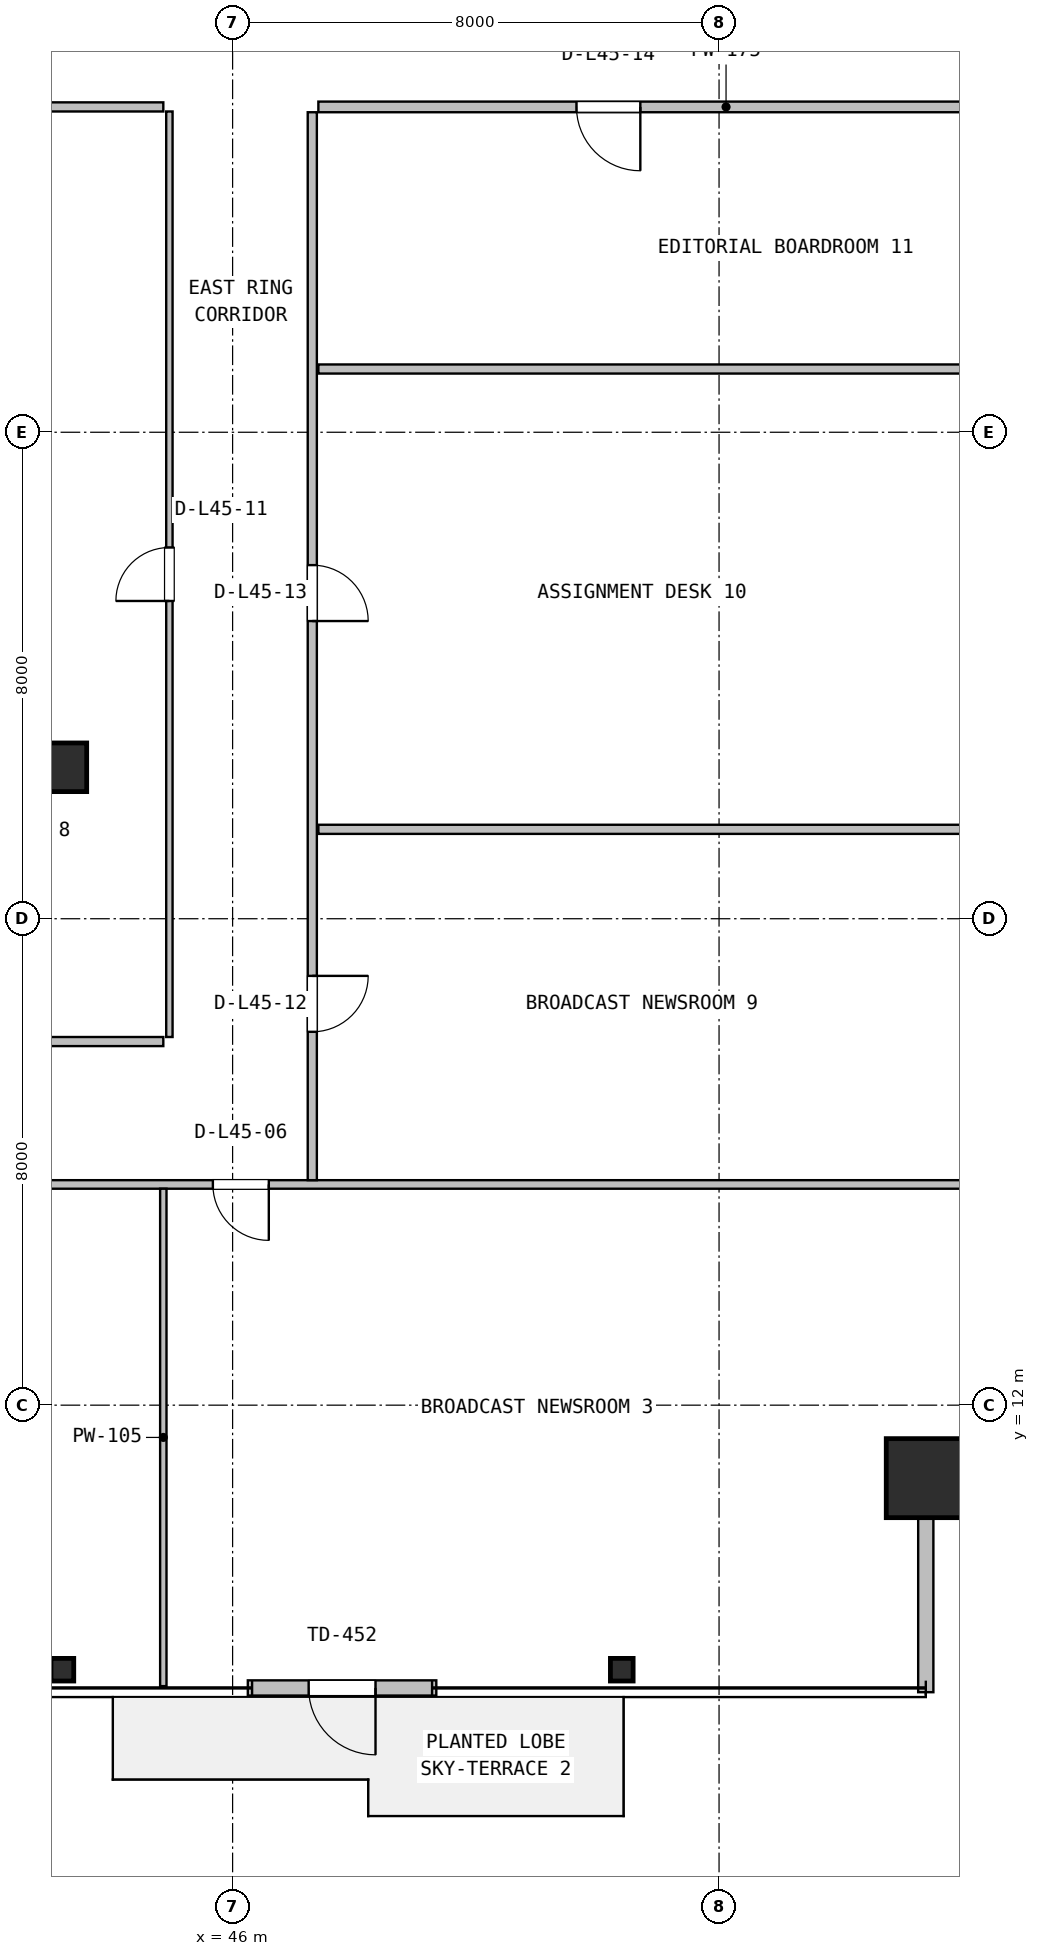
"""IFC4 building model, lengths in metres.
Left out: names, types, materials, properties, quantities, classifications, styles, units other than length and angle.
Written with IfcOpenShell. Run it as: python <this file> out.ifc"""

import sys

from ifc_helpers import new_model, si_unit, direction, frame, frame_2d, origin, origin_2d, place, context, subcontext, project, spatial, rectangle, hollow_rectangle, i_section, extrude, source, transform, mapped, element, fill, save


model = new_model("IFC4")
c1 = context("Model", 3, precision=1e-05, world=origin(), true_north=direction((0.0, 1.0)))
c2 = subcontext(c1, "Body", "Model", "MODEL_VIEW")
j1 = project(units=[si_unit("LENGTHUNIT", "METRE"), si_unit("PLANEANGLEUNIT", "RADIAN")], contexts=[c1])
p1 = place(None, origin())
s1 = spatial("IfcSite", under=j1, at=p1, CompositionType="ELEMENT")
p2 = place(p1, origin())
s2 = spatial("IfcBuilding", under=s1, at=p2, CompositionType="ELEMENT")
p3 = place(p2, frame((0.0, 0.0, 183.8)))
s3 = spatial("IfcBuildingStorey", under=s2, at=p3, CompositionType="ELEMENT", Elevation=183.8)
m1 = source(origin(), c2, "Body", "SweptSolid", [
    extrude(hollow_rectangle(XDim=1.3, YDim=1.3, WallThickness=0.05, at=origin_2d()), origin(), (0.0, 0.0, 1.0), 3.8),
])
p4 = place(p3, frame((57.4, 10.8, 0.0), z_axis=(0.0, 0.0, 1.0), x_axis=(1.0, 0.0, 0.0)))
e1 = element("IfcColumn", 1, at=p4, inside=s3, PredefinedType="COLUMN", context=c2, shape_type="MappedRepresentation", body=[
    mapped(m1, transform((0.0, 0.0, 0.0), x_axis=(1.0, 0.0, 0.0), y_axis=(0.0, 1.0, 0.0), z_axis=(0.0, 0.0, 1.0), scale=1.0)),
])
m2 = source(origin(), c2, "Body", "SweptSolid", [
    extrude(i_section(OverallWidth=0.374, OverallDepth=0.372, WebThickness=0.016, FlangeThickness=0.026, FilletRadius=0.016, at=origin_2d()), origin(), (0.0, 0.0, 1.0), 3.8),
])
for number, where, z_axis, x_axis in (
    (2, (43.2, 7.65, 0.0), (0.0, 0.0, 1.0), (1.0, 0.0, 0.0)),
    (3, (52.4, 7.65, 0.0), (0.0, 0.0, 1.0), (1.0, 0.0, 0.0)),
):
    element("IfcColumn", number, at=place(p3, frame(where, z_axis=z_axis, x_axis=x_axis)), inside=s3, PredefinedType="COLUMN", context=c2, shape_type="MappedRepresentation", body=[
        mapped(m2, transform((0.0, 0.0, 0.0), x_axis=(1.0, 0.0, 0.0), y_axis=(0.0, 1.0, 0.0), z_axis=(0.0, 0.0, 1.0), scale=1.0)),
    ])
m3 = source(origin(), c2, "Body", "SweptSolid", [
    extrude(rectangle(XDim=0.8, YDim=0.8, at=origin_2d()), origin(), (0.0, 0.0, 1.0), 3.8),
])
p5 = place(p3, frame((43.2, 22.49, 0.0), z_axis=(0.0, 0.0, 1.0), x_axis=(1.0, 0.0, 0.0)))
e4 = element("IfcColumn", 4, at=p5, inside=s3, PredefinedType="COLUMN", context=c2, shape_type="MappedRepresentation", body=[
    mapped(m3, transform((0.0, 0.0, 0.0), x_axis=(1.0, 0.0, 0.0), y_axis=(0.0, 1.0, 0.0), z_axis=(0.0, 0.0, 1.0), scale=1.0)),
])
p6 = place(p3, frame((46.25, 7.35, 0.0), z_axis=(0.0, 0.0, 1.0), x_axis=(1.0, 0.0, 0.0)))
e5 = element("IfcWall", 5, at=p6, inside=s3, PredefinedType="SOLIDWALL", context=c2, shape_type="SweptSolid", body=[
    extrude(rectangle(XDim=3.1, YDim=0.25, at=frame_2d((1.55, 0.0))), origin(), (0.0, 0.0, 1.0), 3.53),
])
p7 = place(p6, frame((1.0, 0.0, 0.0)))
e6 = element("IfcOpeningElement", 6, at=p7, cuts=e5, PredefinedType="OPENING", context=c2, shape_type="SweptSolid", body=[
    extrude(rectangle(XDim=1.1, YDim=2.15, at=frame_2d((0.55, 1.075))), frame((0.0, 0.135, 0.0), z_axis=(0.0, -1.0, 0.0), x_axis=(1.0, 0.0, 0.0)), (0.0, 0.0, 1.0), 0.27),
])
p8 = place(p3, frame((57.4, 7.28, 0.0), z_axis=(0.0, 0.0, 1.0), x_axis=(0.0, 1.0, 0.0)))
e7 = element("IfcWall", 7, at=p8, inside=s3, PredefinedType="SOLIDWALL", context=c2, shape_type="SweptSolid", body=[
    extrude(rectangle(XDim=3.6, YDim=0.25, at=frame_2d((1.8, 0.0))), origin(), (0.0, 0.0, 1.0), 3.108),
])
p9 = place(p3, frame((7.18, 15.63, 0.0), z_axis=(0.0, 0.0, 1.0), x_axis=(1.0, 0.0, 0.0)))
e8 = element("IfcWall", 8, at=p9, inside=s3, PredefinedType="PARTITIONING", context=c2, shape_type="SweptSolid", body=[
    extrude(rectangle(XDim=53.64, YDim=0.14, at=frame_2d((26.82, 0.0))), origin(), (0.0, 0.0, 1.0), 2.909),
])
p10 = place(p9, frame((14.015, 0.0, 0.0)))
e9 = element("IfcOpeningElement", 9, at=p10, cuts=e8, PredefinedType="OPENING", context=c2, shape_type="SweptSolid", body=[
    extrude(rectangle(XDim=1.0, YDim=2.1, at=frame_2d((0.5, 1.05))), frame((0.0, 0.08, 0.0), z_axis=(0.0, -1.0, 0.0), x_axis=(1.0, 0.0, 0.0)), (0.0, 0.0, 1.0), 0.16),
])
p11 = place(p9, frame((26.295, 0.0, 0.0)))
e10 = element("IfcOpeningElement", 10, at=p11, cuts=e8, PredefinedType="OPENING", context=c2, shape_type="SweptSolid", body=[
    extrude(rectangle(XDim=0.88, YDim=2.06, at=frame_2d((0.44, 1.03))), frame((0.0, 0.08, 0.0), z_axis=(0.0, -1.0, 0.0), x_axis=(1.0, 0.0, 0.0)), (0.0, 0.0, 1.0), 0.16),
])
p12 = place(p9, frame((38.495, 0.0, 0.0)))
e11 = element("IfcOpeningElement", 11, at=p12, cuts=e8, PredefinedType="OPENING", context=c2, shape_type="SweptSolid", body=[
    extrude(rectangle(XDim=0.92, YDim=2.08, at=frame_2d((0.46, 1.04))), frame((0.0, 0.08, 0.0), z_axis=(0.0, -1.0, 0.0), x_axis=(1.0, 0.0, 0.0)), (0.0, 0.0, 1.0), 0.16),
])
p13 = place(p3, frame((44.86, 7.38, 0.0), z_axis=(0.0, 0.0, 1.0), x_axis=(0.0, 1.0, 0.0)))
e12 = element("IfcWall", 12, at=p13, inside=s3, PredefinedType="PARTITIONING", context=c2, shape_type="SweptSolid", body=[
    extrude(rectangle(XDim=8.18, YDim=0.105, at=frame_2d((4.09, 0.0))), origin(), (0.0, 0.0, 1.0), 3.108),
])
p14 = place(p3, frame((22.97, 17.98, 0.0), z_axis=(0.0, 0.0, 1.0), x_axis=(1.0, 0.0, 0.0)))
e13 = element("IfcWall", 13, at=p14, inside=s3, PredefinedType="PARTITIONING", context=c2, shape_type="SweptSolid", body=[
    extrude(rectangle(XDim=21.89, YDim=0.15, at=frame_2d((10.945, 0.0))), origin(), (0.0, 0.0, 1.0), 2.909),
])
p15 = place(p14, frame((11.455, 0.0, 0.0)))
e14 = element("IfcOpeningElement", 14, at=p15, cuts=e13, PredefinedType="OPENING", context=c2, shape_type="SweptSolid", body=[
    extrude(rectangle(XDim=1.0, YDim=2.1, at=frame_2d((0.5, 1.05))), frame((0.0, 0.085, 0.0), z_axis=(0.0, -1.0, 0.0), x_axis=(1.0, 0.0, 0.0)), (0.0, 0.0, 1.0), 0.17),
])
p16 = place(p3, frame((22.97, 33.35, 0.0), z_axis=(0.0, 0.0, 1.0), x_axis=(1.0, 0.0, 0.0)))
e15 = element("IfcWall", 15, at=p16, inside=s3, PredefinedType="PARTITIONING", context=c2, shape_type="SweptSolid", body=[
    extrude(rectangle(XDim=21.89, YDim=0.15, at=frame_2d((10.945, 0.0))), origin(), (0.0, 0.0, 1.0), 2.909),
])
p17 = place(p3, frame((44.96, 18.055, 0.0), z_axis=(0.0, 0.0, 1.0), x_axis=(0.0, 1.0, 0.0)))
e16 = element("IfcWall", 16, at=p17, inside=s3, PredefinedType="PARTITIONING", context=c2, shape_type="SweptSolid", body=[
    extrude(rectangle(XDim=15.22, YDim=0.105, at=frame_2d((7.61, 0.0))), origin(), (0.0, 0.0, 1.0), 3.222),
])
p18 = place(p17, frame((7.17, 0.0, 0.0)))
e17 = element("IfcOpeningElement", 17, at=p18, cuts=e16, PredefinedType="OPENING", context=c2, shape_type="SweptSolid", body=[
    extrude(rectangle(XDim=0.88, YDim=2.06, at=frame_2d((0.44, 1.03))), frame((0.0, 0.062, 0.0), z_axis=(0.0, -1.0, 0.0), x_axis=(1.0, 0.0, 0.0)), (0.0, 0.0, 1.0), 0.125),
])
p19 = place(p3, frame((47.41, 21.47, 0.0), z_axis=(0.0, 0.0, 1.0), x_axis=(1.0, 0.0, 0.0)))
e18 = element("IfcWall", 18, at=p19, inside=s3, PredefinedType="PARTITIONING", context=c2, shape_type="SweptSolid", body=[
    extrude(rectangle(XDim=13.41, YDim=0.15, at=frame_2d((6.705, 0.0))), origin(), (0.0, 0.0, 1.0), 3.108),
])
p20 = place(p3, frame((47.31, 15.7, 0.0), z_axis=(0.0, 0.0, 1.0), x_axis=(0.0, 1.0, 0.0)))
e19 = element("IfcWall", 19, at=p20, inside=s3, PredefinedType="PARTITIONING", context=c2, shape_type="SweptSolid", body=[
    extrude(rectangle(XDim=17.563, YDim=0.15, at=frame_2d((8.781, 0.0))), origin(), (0.0, 0.0, 1.0), 3.222),
])
p21 = place(p20, frame((2.44, 0.0, 0.0)))
e20 = element("IfcOpeningElement", 20, at=p21, cuts=e19, PredefinedType="OPENING", context=c2, shape_type="SweptSolid", body=[
    extrude(rectangle(XDim=0.92, YDim=2.08, at=frame_2d((0.46, 1.04))), frame((0.0, 0.085, 0.0), z_axis=(0.0, -1.0, 0.0), x_axis=(1.0, 0.0, 0.0)), (0.0, 0.0, 1.0), 0.17),
])
p22 = place(p20, frame((9.195, 0.0, 0.0)))
e21 = element("IfcOpeningElement", 21, at=p22, cuts=e19, PredefinedType="OPENING", context=c2, shape_type="SweptSolid", body=[
    extrude(rectangle(XDim=0.92, YDim=2.08, at=frame_2d((0.46, 1.04))), frame((0.0, 0.085, 0.0), z_axis=(0.0, -1.0, 0.0), x_axis=(1.0, 0.0, 0.0)), (0.0, 0.0, 1.0), 0.17),
])
p23 = place(p3, frame((47.41, 29.04, 0.0), z_axis=(0.0, 0.0, 1.0), x_axis=(1.0, 0.0, 0.0)))
e22 = element("IfcWall", 22, at=p23, inside=s3, PredefinedType="PARTITIONING", context=c2, shape_type="SweptSolid", body=[
    extrude(rectangle(XDim=13.41, YDim=0.15, at=frame_2d((6.705, 0.0))), origin(), (0.0, 0.0, 1.0), 3.108),
])
p24 = place(p3, frame((47.41, 33.35, 0.0), z_axis=(0.0, 0.0, 1.0), x_axis=(1.0, 0.0, 0.0)))
e23 = element("IfcWall", 23, at=p24, inside=s3, PredefinedType="PARTITIONING", context=c2, shape_type="SweptSolid", body=[
    extrude(rectangle(XDim=13.41, YDim=0.175, at=frame_2d((6.705, 0.0))), origin(), (0.0, 0.0, 1.0), 3.108),
])
p25 = place(p24, frame((4.245, 0.0, 0.0)))
e24 = element("IfcOpeningElement", 24, at=p25, cuts=e23, PredefinedType="OPENING", context=c2, shape_type="SweptSolid", body=[
    extrude(rectangle(XDim=1.05, YDim=2.1, at=frame_2d((0.525, 1.05))), frame((0.0, 0.098, 0.0), z_axis=(0.0, -1.0, 0.0), x_axis=(1.0, 0.0, 0.0)), (0.0, 0.0, 1.0), 0.195),
])
m4 = source(origin(), c2, "Body", "SweptSolid", [
    extrude(rectangle(XDim=1.1, YDim=2.15, at=frame_2d((0.55, 1.075))), frame((0.0, 0.025, 0.0), z_axis=(0.0, -1.0, 0.0), x_axis=(1.0, 0.0, 0.0)), (0.0, 0.0, 1.0), 0.05),
])
p26 = place(p7, frame((1.1, 0.0, 0.0), z_axis=(0.0, 0.0, 1.0), x_axis=(-1.0, 0.0, 0.0)))
e25 = element("IfcDoor", 25, at=p26, inside=s3, OperationType="SINGLE_SWING_RIGHT", PredefinedType="DOOR", context=c2, shape_type="MappedRepresentation", body=[
    mapped(m4, transform((0.0, 0.0, 0.0), x_axis=(1.0, 0.0, 0.0), y_axis=(0.0, 1.0, 0.0), z_axis=(0.0, 0.0, 1.0), scale=1.0)),
])
fill(e6, e25)
m5 = source(origin(), c2, "Body", "SweptSolid", [
    extrude(rectangle(XDim=0.92, YDim=2.08, at=frame_2d((0.46, 1.04))), frame((0.0, 0.025, 0.0), z_axis=(0.0, -1.0, 0.0), x_axis=(1.0, 0.0, 0.0)), (0.0, 0.0, 1.0), 0.05),
])
p27 = place(p12, frame((0.92, 0.0, 0.0), z_axis=(0.0, 0.0, 1.0), x_axis=(-1.0, 0.0, 0.0)))
e26 = element("IfcDoor", 26, at=p27, inside=s3, OperationType="SINGLE_SWING_RIGHT", PredefinedType="DOOR", context=c2, shape_type="MappedRepresentation", body=[
    mapped(m5, transform((0.0, 0.0, 0.0), x_axis=(1.0, 0.0, 0.0), y_axis=(0.0, 1.0, 0.0), z_axis=(0.0, 0.0, 1.0), scale=1.0)),
])
fill(e11, e26)
m6 = source(origin(), c2, "Body", "SweptSolid", [
    extrude(rectangle(XDim=0.88, YDim=2.06, at=frame_2d((0.44, 1.03))), frame((0.0, 0.025, 0.0), z_axis=(0.0, -1.0, 0.0), x_axis=(1.0, 0.0, 0.0)), (0.0, 0.0, 1.0), 0.05),
])
p28 = place(p18, origin())
e27 = element("IfcDoor", 27, at=p28, inside=s3, OperationType="SINGLE_SWING_LEFT", PredefinedType="DOOR", context=c2, shape_type="MappedRepresentation", body=[
    mapped(m6, transform((0.0, 0.0, 0.0), x_axis=(1.0, 0.0, 0.0), y_axis=(0.0, 1.0, 0.0), z_axis=(0.0, 0.0, 1.0), scale=1.0)),
])
fill(e17, e27)
p29 = place(p21, frame((0.92, 0.0, 0.0), z_axis=(0.0, 0.0, 1.0), x_axis=(-1.0, 0.0, 0.0)))
e28 = element("IfcDoor", 28, at=p29, inside=s3, OperationType="SINGLE_SWING_RIGHT", PredefinedType="DOOR", context=c2, shape_type="MappedRepresentation", body=[
    mapped(m5, transform((0.0, 0.0, 0.0), x_axis=(1.0, 0.0, 0.0), y_axis=(0.0, 1.0, 0.0), z_axis=(0.0, 0.0, 1.0), scale=1.0)),
])
fill(e20, e28)
p30 = place(p22, frame((0.92, 0.0, 0.0), z_axis=(0.0, 0.0, 1.0), x_axis=(-1.0, 0.0, 0.0)))
e29 = element("IfcDoor", 29, at=p30, inside=s3, OperationType="SINGLE_SWING_LEFT", PredefinedType="DOOR", context=c2, shape_type="MappedRepresentation", body=[
    mapped(m5, transform((0.0, 0.0, 0.0), x_axis=(1.0, 0.0, 0.0), y_axis=(0.0, 1.0, 0.0), z_axis=(0.0, 0.0, 1.0), scale=1.0)),
])
fill(e21, e29)
m7 = source(origin(), c2, "Body", "SweptSolid", [
    extrude(rectangle(XDim=1.05, YDim=2.1, at=frame_2d((0.525, 1.05))), frame((0.0, 0.025, 0.0), z_axis=(0.0, -1.0, 0.0), x_axis=(1.0, 0.0, 0.0)), (0.0, 0.0, 1.0), 0.05),
])
p31 = place(p25, frame((1.05, 0.0, 0.0), z_axis=(0.0, 0.0, 1.0), x_axis=(-1.0, 0.0, 0.0)))
e30 = element("IfcDoor", 30, at=p31, inside=s3, OperationType="SINGLE_SWING_RIGHT", PredefinedType="DOOR", context=c2, shape_type="MappedRepresentation", body=[
    mapped(m7, transform((0.0, 0.0, 0.0), x_axis=(1.0, 0.0, 0.0), y_axis=(0.0, 1.0, 0.0), z_axis=(0.0, 0.0, 1.0), scale=1.0)),
])
fill(e24, e30)
save(model, sys.argv[1])
